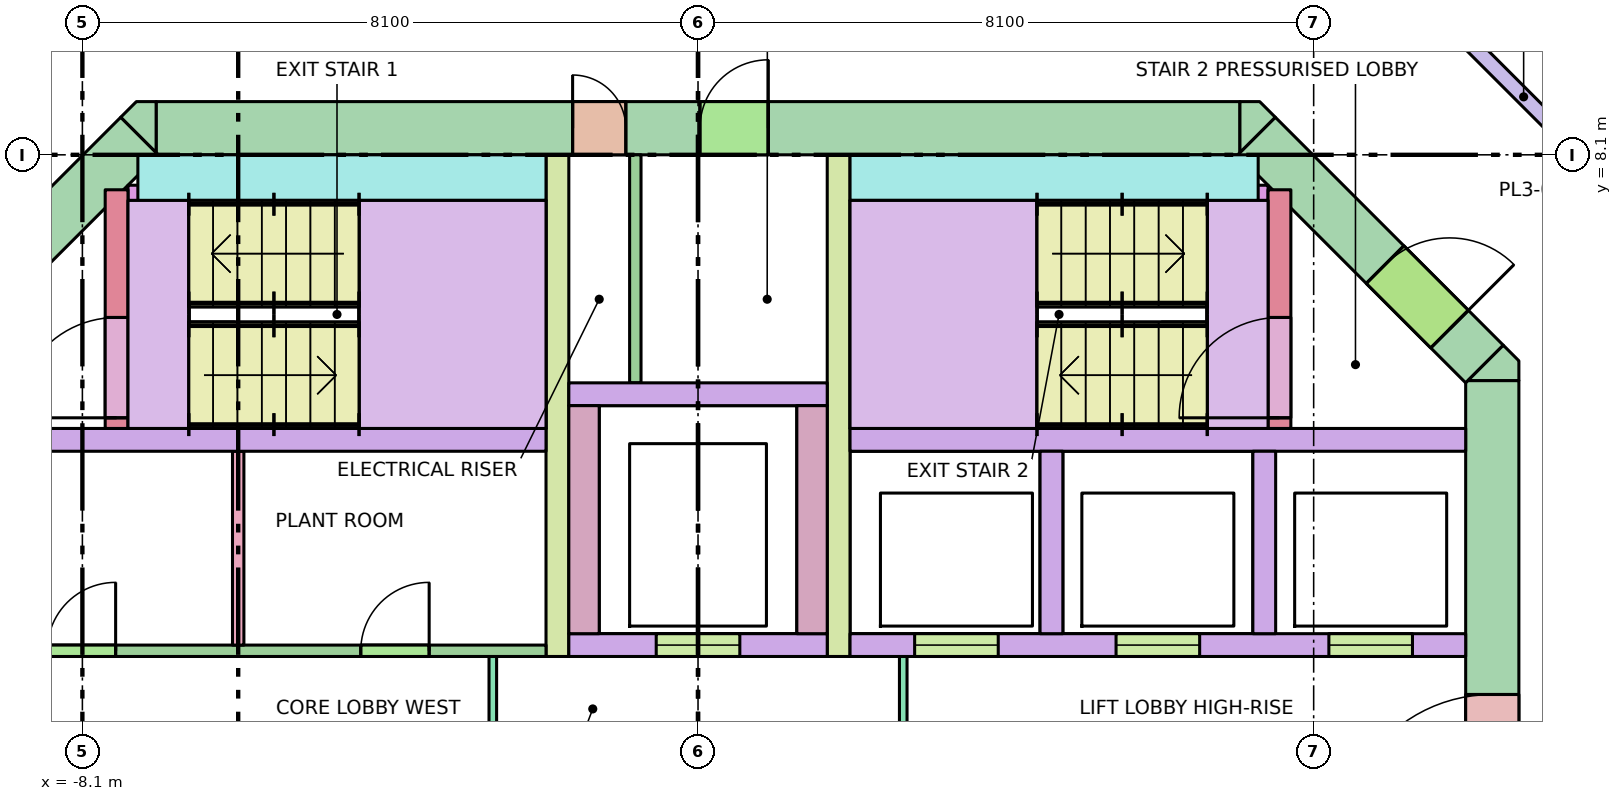
"""IFC4 building model, lengths in metres.
Left out: names, types, materials, properties, quantities, classifications, styles, units other than length and angle.
Written with IfcOpenShell. Run it as: python <this file> out.ifc"""

import sys

from ifc_helpers import new_model, si_unit, direction, frame, frame_2d, origin, place, context, subcontext, project, spatial, polyline, rectangle, outline, extrude, element, fill, save


model = new_model("IFC4")
c1 = context("Model", 3, precision=1e-05, world=origin(), true_north=direction((0.0, 1.0)))
c2 = subcontext(c1, "Body", "Model", "MODEL_VIEW")
j1 = project(units=[si_unit("LENGTHUNIT", "METRE"), si_unit("PLANEANGLEUNIT", "RADIAN")], contexts=[c1])
p1 = place(None, origin())
s1 = spatial("IfcSite", under=j1, at=p1, CompositionType="ELEMENT")
p2 = place(p1, origin())
s2 = spatial("IfcBuilding", under=s1, at=p2, CompositionType="ELEMENT")
p3 = place(p2, frame((0.0, 0.0, 248.3)))
s3 = spatial("IfcBuildingStorey", under=s2, at=p3, CompositionType="ELEMENT", Elevation=248.3)
p4 = place(p3, frame((-7.13, 8.45, -0.28), z_axis=(0.0, 0.0, 1.0), x_axis=(1.0, 0.0, 0.0)))
e1 = element("IfcWall", 1, at=p4, inside=s3, PredefinedType="SHEAR", context=c2, shape_type="SweptSolid", body=[
    extrude(rectangle(XDim=14.26, YDim=0.7, at=frame_2d((7.13, 0.0))), origin(), (0.0, 0.0, 1.0), 5.5),
])
p5 = place(p4, frame((5.48, 0.0, 0.28)))
e2 = element("IfcOpeningElement", 2, at=p5, cuts=e1, PredefinedType="OPENING", context=c2, shape_type="SweptSolid", body=[
    extrude(rectangle(XDim=0.7, YDim=2.1, at=frame_2d((0.35, 1.05))), frame((0.0, 0.36, 0.0), z_axis=(0.0, -1.0, 0.0), x_axis=(1.0, 0.0, 0.0)), (0.0, 0.0, 1.0), 0.72),
])
p6 = place(p4, frame((7.155, 0.0, 0.28)))
e3 = element("IfcOpeningElement", 3, at=p6, cuts=e1, PredefinedType="OPENING", context=c2, shape_type="SweptSolid", body=[
    extrude(rectangle(XDim=0.9, YDim=2.1, at=frame_2d((0.45, 1.05))), frame((0.0, 0.36, 0.0), z_axis=(0.0, -1.0, 0.0), x_axis=(1.0, 0.0, 0.0)), (0.0, 0.0, 1.0), 0.72),
])
p7 = place(p3, frame((10.45, -5.13, -0.28), z_axis=(0.0, 0.0, 1.0), x_axis=(0.0, 1.0, 0.0)))
e4 = element("IfcWall", 4, at=p7, inside=s3, PredefinedType="SHEAR", context=c2, shape_type="SweptSolid", body=[
    extrude(rectangle(XDim=10.26, YDim=0.7, at=frame_2d((5.13, 0.0))), origin(), (0.0, 0.0, 1.0), 5.5),
])
p8 = place(p7, frame((4.13, 0.0, 0.28)))
e5 = element("IfcOpeningElement", 5, at=p8, cuts=e4, PredefinedType="OPENING", context=c2, shape_type="SweptSolid", body=[
    extrude(rectangle(XDim=2.0, YDim=2.1, at=frame_2d((1.0, 1.05))), frame((0.0, 0.36, 0.0), z_axis=(0.0, -1.0, 0.0), x_axis=(1.0, 0.0, 0.0)), (0.0, 0.0, 1.0), 0.72),
])
p9 = place(p3, frame((-10.347, 5.347, -0.28), z_axis=(0.0, 0.0, 1.0), x_axis=(0.707106781187, 0.707106781187, 0.0)))
e6 = element("IfcWall", 6, at=p9, inside=s3, PredefinedType="SHEAR", context=c2, shape_type="SweptSolid", body=[
    extrude(rectangle(XDim=4.243, YDim=0.7, at=frame_2d((2.121, 0.0))), origin(), (0.0, 0.0, 1.0), 5.5),
])
p10 = place(p9, frame((0.65, 0.0, 0.28)))
e7 = element("IfcOpeningElement", 7, at=p10, cuts=e6, PredefinedType="OPENING", context=c2, shape_type="SweptSolid", body=[
    extrude(rectangle(XDim=1.2, YDim=2.1, at=frame_2d((0.6, 1.05))), frame((0.0, 0.36, 0.0), z_axis=(0.0, -1.0, 0.0), x_axis=(1.0, 0.0, 0.0)), (0.0, 0.0, 1.0), 0.72),
])
p11 = place(p3, frame((7.347, 8.347, -0.28), z_axis=(0.0, 0.0, 1.0), x_axis=(0.707106781187, -0.707106781187, 0.0)))
e8 = element("IfcWall", 8, at=p11, inside=s3, PredefinedType="SHEAR", context=c2, shape_type="SweptSolid", body=[
    extrude(rectangle(XDim=4.243, YDim=0.7, at=frame_2d((2.121, 0.0))), origin(), (0.0, 0.0, 1.0), 5.5),
])
p12 = place(p11, frame((2.393, 0.0, 0.28)))
e9 = element("IfcOpeningElement", 9, at=p12, cuts=e8, PredefinedType="OPENING", context=c2, shape_type="SweptSolid", body=[
    extrude(rectangle(XDim=1.2, YDim=2.1, at=frame_2d((0.6, 1.05))), frame((0.0, 0.36, 0.0), z_axis=(0.0, -1.0, 0.0), x_axis=(1.0, 0.0, 0.0)), (0.0, 0.0, 1.0), 0.72),
])
p13 = place(p3, frame((0.0, 0.0, -0.28)))
e10 = element("IfcWall", 10, at=p13, inside=s3, PredefinedType="SHEAR", context=c2, shape_type="SweptSolid", body=[
    extrude(outline(polyline([(10.8, 5.39), (10.8, 5.13), (10.8, 5.13), (10.13, 5.13), (10.595, 5.595), (10.595, 5.595), (10.595, 5.595), (10.8, 5.39)])), origin(), (0.0, 0.0, 1.0), 5.5),
])
p14 = place(p3, frame((0.0, 0.0, -0.28)))
e11 = element("IfcWall", 11, at=p14, inside=s3, PredefinedType="SHEAR", context=c2, shape_type="SweptSolid", body=[
    extrude(outline(polyline([(-7.39, 8.8), (-7.13, 8.8), (-7.13, 8.8), (-7.13, 8.13), (-7.595, 8.595), (-7.595, 8.595), (-7.595, 8.595), (-7.39, 8.8)])), origin(), (0.0, 0.0, 1.0), 5.5),
])
p15 = place(p3, frame((0.0, 0.0, -0.28)))
e12 = element("IfcWall", 12, at=p15, inside=s3, PredefinedType="SHEAR", context=c2, shape_type="SweptSolid", body=[
    extrude(outline(polyline([(7.39, 8.8), (7.595, 8.595), (7.595, 8.595), (7.595, 8.595), (7.13, 8.13), (7.13, 8.8), (7.13, 8.8), (7.39, 8.8)])), origin(), (0.0, 0.0, 1.0), 5.5),
])
for number, where, z_axis, x_axis in (
    (13, (-10.1, 4.35, 0.0), (0.0, 0.0, 1.0), (1.0, 0.0, 0.0)),
    (14, (2.0, 4.35, 0.0), (0.0, 0.0, 1.0), (1.0, 0.0, 0.0)),
):
    element("IfcWall", number, at=place(p3, frame(where, z_axis=z_axis, x_axis=x_axis)), inside=s3, PredefinedType="SOLIDWALL", context=c2, shape_type="SweptSolid", body=[
        extrude(rectangle(XDim=8.1, YDim=0.3, at=frame_2d((4.05, 0.0))), origin(), (0.0, 0.0, 1.0), 5.22),
    ])
p16 = place(p3, frame((2.0, 1.65, 0.0), z_axis=(0.0, 0.0, 1.0), x_axis=(1.0, 0.0, 0.0)))
e15 = element("IfcWall", 15, at=p16, inside=s3, PredefinedType="SOLIDWALL", context=c2, shape_type="SweptSolid", body=[
    extrude(rectangle(XDim=8.1, YDim=0.3, at=frame_2d((4.05, 0.0))), origin(), (0.0, 0.0, 1.0), 5.22),
])
p17 = place(p16, frame((0.85, 0.0, 0.0)))
e16 = element("IfcOpeningElement", 16, at=p17, cuts=e15, PredefinedType="OPENING", context=c2, shape_type="SweptSolid", body=[
    extrude(rectangle(XDim=1.1, YDim=2.1, at=frame_2d((0.55, 1.05))), frame((0.0, 0.16, 0.0), z_axis=(0.0, -1.0, 0.0), x_axis=(1.0, 0.0, 0.0)), (0.0, 0.0, 1.0), 0.32),
])
p18 = place(p16, frame((3.5, 0.0, 0.0)))
e17 = element("IfcOpeningElement", 17, at=p18, cuts=e15, PredefinedType="OPENING", context=c2, shape_type="SweptSolid", body=[
    extrude(rectangle(XDim=1.1, YDim=2.1, at=frame_2d((0.55, 1.05))), frame((0.0, 0.16, 0.0), z_axis=(0.0, -1.0, 0.0), x_axis=(1.0, 0.0, 0.0)), (0.0, 0.0, 1.0), 0.32),
])
p19 = place(p16, frame((6.3, 0.0, 0.0)))
e18 = element("IfcOpeningElement", 18, at=p19, cuts=e15, PredefinedType="OPENING", context=c2, shape_type="SweptSolid", body=[
    extrude(rectangle(XDim=1.1, YDim=2.1, at=frame_2d((0.55, 1.05))), frame((0.0, 0.16, 0.0), z_axis=(0.0, -1.0, 0.0), x_axis=(1.0, 0.0, 0.0)), (0.0, 0.0, 1.0), 0.32),
])
for number, where, z_axis, x_axis in (
    (19, (4.65, 1.8, 0.0), (0.0, 0.0, 1.0), (0.0, 1.0, 0.0)),
    (20, (7.45, 1.8, 0.0), (0.0, 0.0, 1.0), (0.0, 1.0, 0.0)),
):
    element("IfcWall", number, at=place(p3, frame(where, z_axis=z_axis, x_axis=x_axis)), inside=s3, PredefinedType="SOLIDWALL", context=c2, shape_type="SweptSolid", body=[
        extrude(rectangle(XDim=2.4, YDim=0.3, at=frame_2d((1.2, 0.0))), origin(), (0.0, 0.0, 1.0), 5.22),
    ])
for number, where, z_axis, x_axis in (
    (21, (-1.85, 1.5, 0.0), (0.0, 0.0, 1.0), (0.0, 1.0, 0.0)),
    (22, (1.85, 1.5, 0.0), (0.0, 0.0, 1.0), (0.0, 1.0, 0.0)),
):
    element("IfcWall", number, at=place(p3, frame(where, z_axis=z_axis, x_axis=x_axis)), inside=s3, PredefinedType="SHEAR", context=c2, shape_type="SweptSolid", body=[
        extrude(rectangle(XDim=6.6, YDim=0.3, at=frame_2d((3.3, 0.0))), origin(), (0.0, 0.0, 1.0), 5.22),
    ])
p20 = place(p3, frame((-1.7, 1.65, 0.0), z_axis=(0.0, 0.0, 1.0), x_axis=(1.0, 0.0, 0.0)))
e23 = element("IfcWall", 23, at=p20, inside=s3, PredefinedType="SOLIDWALL", context=c2, shape_type="SweptSolid", body=[
    extrude(rectangle(XDim=3.4, YDim=0.3, at=frame_2d((1.7, 0.0))), origin(), (0.0, 0.0, 1.0), 5.22),
])
p21 = place(p20, frame((1.15, 0.0, 0.0)))
e24 = element("IfcOpeningElement", 24, at=p21, cuts=e23, PredefinedType="OPENING", context=c2, shape_type="SweptSolid", body=[
    extrude(rectangle(XDim=1.1, YDim=2.1, at=frame_2d((0.55, 1.05))), frame((0.0, 0.16, 0.0), z_axis=(0.0, -1.0, 0.0), x_axis=(1.0, 0.0, 0.0)), (0.0, 0.0, 1.0), 0.32),
])
for number, where, z_axis, x_axis in (
    (25, (-1.5, 1.8, 0.0), (0.0, 0.0, 1.0), (0.0, 1.0, 0.0)),
    (26, (1.5, 1.8, 0.0), (0.0, 0.0, 1.0), (0.0, 1.0, 0.0)),
):
    element("IfcWall", number, at=place(p3, frame(where, z_axis=z_axis, x_axis=x_axis)), inside=s3, PredefinedType="SOLIDWALL", context=c2, shape_type="SweptSolid", body=[
        extrude(rectangle(XDim=3.0, YDim=0.4, at=frame_2d((1.5, 0.0))), origin(), (0.0, 0.0, 1.0), 5.22),
    ])
p22 = place(p3, frame((-1.7, 4.95, 0.0), z_axis=(0.0, 0.0, 1.0), x_axis=(1.0, 0.0, 0.0)))
e27 = element("IfcWall", 27, at=p22, inside=s3, PredefinedType="SOLIDWALL", context=c2, shape_type="SweptSolid", body=[
    extrude(rectangle(XDim=3.4, YDim=0.3, at=frame_2d((1.7, 0.0))), origin(), (0.0, 0.0, 1.0), 5.22),
])
p23 = place(p3, frame((-7.65, 4.5, 0.0), z_axis=(0.0, 0.0, 1.0), x_axis=(0.0, 1.0, 0.0)))
e28 = element("IfcWall", 28, at=p23, inside=s3, PredefinedType="SHEAR", context=c2, shape_type="SweptSolid", body=[
    extrude(rectangle(XDim=3.14, YDim=0.3, at=frame_2d((1.57, 0.0))), origin(), (0.0, 0.0, 1.0), 5.22),
])
p24 = place(p23, frame((0.14, 0.0, 0.0)))
e29 = element("IfcOpeningElement", 29, at=p24, cuts=e28, PredefinedType="OPENING", context=c2, shape_type="SweptSolid", body=[
    extrude(rectangle(XDim=1.32, YDim=2.1, at=frame_2d((0.66, 1.05))), frame((0.0, 0.16, 0.0), z_axis=(0.0, -1.0, 0.0), x_axis=(1.0, 0.0, 0.0)), (0.0, 0.0, 1.0), 0.32),
])
p25 = place(p3, frame((-7.37, 7.8, 0.0), z_axis=(0.0, 0.0, 1.0), x_axis=(1.0, 0.0, 0.0)))
e30 = element("IfcWall", 30, at=p25, inside=s3, PredefinedType="SHEAR", context=c2, shape_type="SweptSolid", body=[
    extrude(rectangle(XDim=5.37, YDim=0.6, at=frame_2d((2.685, 0.0))), origin(), (0.0, 0.0, 1.0), 5.22),
])
p26 = place(p3, frame((7.65, 4.5, 0.0), z_axis=(0.0, 0.0, 1.0), x_axis=(0.0, 1.0, 0.0)))
e31 = element("IfcWall", 31, at=p26, inside=s3, PredefinedType="SHEAR", context=c2, shape_type="SweptSolid", body=[
    extrude(rectangle(XDim=3.14, YDim=0.3, at=frame_2d((1.57, 0.0))), origin(), (0.0, 0.0, 1.0), 5.22),
])
p27 = place(p26, frame((0.14, 0.0, 0.0)))
e32 = element("IfcOpeningElement", 32, at=p27, cuts=e31, PredefinedType="OPENING", context=c2, shape_type="SweptSolid", body=[
    extrude(rectangle(XDim=1.32, YDim=2.1, at=frame_2d((0.66, 1.05))), frame((0.0, 0.16, 0.0), z_axis=(0.0, -1.0, 0.0), x_axis=(1.0, 0.0, 0.0)), (0.0, 0.0, 1.0), 0.32),
])
p28 = place(p3, frame((2.0, 7.8, 0.0), z_axis=(0.0, 0.0, 1.0), x_axis=(1.0, 0.0, 0.0)))
e33 = element("IfcWall", 33, at=p28, inside=s3, PredefinedType="SHEAR", context=c2, shape_type="SweptSolid", body=[
    extrude(rectangle(XDim=5.37, YDim=0.6, at=frame_2d((2.685, 0.0))), origin(), (0.0, 0.0, 1.0), 5.22),
])
for number, where, z_axis, x_axis in (
    (34, (-7.5, 7.6, 0.0), (0.0, 0.0, 1.0), (1.0, 0.0, 0.0)),
    (35, (6.9, 7.6, 0.0), (0.0, 0.0, 1.0), (1.0, 0.0, 0.0)),
):
    element("IfcWall", number, at=place(p3, frame(where, z_axis=z_axis, x_axis=x_axis)), inside=s3, PredefinedType="SHEAR", context=c2, shape_type="SweptSolid", body=[
        extrude(rectangle(XDim=0.6, YDim=0.2, at=frame_2d((0.3, 0.0))), origin(), (0.0, 0.0, 1.0), 5.22),
    ])
p29 = place(p3, frame((-2.7, -1.5, 0.0), z_axis=(0.0, 0.0, 1.0), x_axis=(0.0, 1.0, 0.0)))
e36 = element("IfcWall", 36, at=p29, inside=s3, PredefinedType="PARTITIONING", context=c2, shape_type="SweptSolid", body=[
    extrude(rectangle(XDim=3.0, YDim=0.1, at=frame_2d((1.5, 0.0))), origin(), (0.0, 0.0, 1.0), 5.22),
])
p30 = place(p29, frame((0.9, 0.0, 0.0)))
e37 = element("IfcOpeningElement", 37, at=p30, cuts=e36, PredefinedType="OPENING", context=c2, shape_type="SweptSolid", body=[
    extrude(rectangle(XDim=1.2, YDim=2.1, at=frame_2d((0.6, 1.05))), frame((0.0, 0.06, 0.0), z_axis=(0.0, -1.0, 0.0), x_axis=(1.0, 0.0, 0.0)), (0.0, 0.0, 1.0), 0.12),
])
p31 = place(p3, frame((2.7, -1.5, 0.0), z_axis=(0.0, 0.0, 1.0), x_axis=(0.0, 1.0, 0.0)))
e38 = element("IfcWall", 38, at=p31, inside=s3, PredefinedType="PARTITIONING", context=c2, shape_type="SweptSolid", body=[
    extrude(rectangle(XDim=3.0, YDim=0.1, at=frame_2d((1.5, 0.0))), origin(), (0.0, 0.0, 1.0), 5.22),
])
p32 = place(p31, frame((0.9, 0.0, 0.0)))
e39 = element("IfcOpeningElement", 39, at=p32, cuts=e38, PredefinedType="OPENING", context=c2, shape_type="SweptSolid", body=[
    extrude(rectangle(XDim=1.2, YDim=2.1, at=frame_2d((0.6, 1.05))), frame((0.0, 0.06, 0.0), z_axis=(0.0, -1.0, 0.0), x_axis=(1.0, 0.0, 0.0)), (0.0, 0.0, 1.0), 0.12),
])
p33 = place(p3, frame((-0.825, 5.1, 0.0), z_axis=(0.0, 0.0, 1.0), x_axis=(0.0, 1.0, 0.0)))
e40 = element("IfcWall", 40, at=p33, inside=s3, PredefinedType="PARTITIONING", context=c2, shape_type="SweptSolid", body=[
    extrude(rectangle(XDim=3.0, YDim=0.15, at=frame_2d((1.5, 0.0))), origin(), (0.0, 0.0, 1.0), 5.22),
])
p34 = place(p3, frame((-6.05, 1.65, 0.0), z_axis=(0.0, 0.0, 1.0), x_axis=(0.0, 1.0, 0.0)))
e41 = element("IfcWall", 41, at=p34, inside=s3, PredefinedType="PARTITIONING", context=c2, shape_type="SweptSolid", body=[
    extrude(rectangle(XDim=2.55, YDim=0.15, at=frame_2d((1.275, 0.0))), origin(), (0.0, 0.0, 1.0), 5.22),
])
p35 = place(p3, frame((-10.1, 1.575, 0.0), z_axis=(0.0, 0.0, 1.0), x_axis=(1.0, 0.0, 0.0)))
e42 = element("IfcWall", 42, at=p35, inside=s3, PredefinedType="PARTITIONING", context=c2, shape_type="SweptSolid", body=[
    extrude(rectangle(XDim=8.1, YDim=0.15, at=frame_2d((4.05, 0.0))), origin(), (0.0, 0.0, 1.0), 5.22),
])
p36 = place(p35, frame((1.538, 0.0, 0.0)))
e43 = element("IfcOpeningElement", 43, at=p36, cuts=e42, PredefinedType="OPENING", context=c2, shape_type="SweptSolid", body=[
    extrude(rectangle(XDim=0.9, YDim=2.1, at=frame_2d((0.45, 1.05))), frame((0.0, 0.085, 0.0), z_axis=(0.0, -1.0, 0.0), x_axis=(1.0, 0.0, 0.0)), (0.0, 0.0, 1.0), 0.17),
])
p37 = place(p35, frame((5.663, 0.0, 0.0)))
e44 = element("IfcOpeningElement", 44, at=p37, cuts=e42, PredefinedType="OPENING", context=c2, shape_type="SweptSolid", body=[
    extrude(rectangle(XDim=0.9, YDim=2.1, at=frame_2d((0.45, 1.05))), frame((0.0, 0.085, 0.0), z_axis=(0.0, -1.0, 0.0), x_axis=(1.0, 0.0, 0.0)), (0.0, 0.0, 1.0), 0.17),
])
p38 = place(p3, frame((-13.25, 6.475, 0.0), z_axis=(0.0, 0.0, 1.0), x_axis=(0.707106781187, 0.707106781187, 0.0)))
e45 = element("IfcWall", 45, at=p38, inside=s3, PredefinedType="PARTITIONING", context=c2, shape_type="SweptSolid", body=[
    extrude(rectangle(XDim=6.753, YDim=0.2, at=frame_2d((3.377, 0.0))), origin(), (0.0, 0.0, 1.0), 4.37),
])
p39 = place(p38, frame((5.297, 0.0, 0.0)))
e46 = element("IfcOpeningElement", 46, at=p39, cuts=e45, PredefinedType="OPENING", context=c2, shape_type="SweptSolid", body=[
    extrude(rectangle(XDim=0.9, YDim=2.1, at=frame_2d((0.45, 1.05))), frame((0.0, 0.11, 0.0), z_axis=(0.0, -1.0, 0.0), x_axis=(1.0, 0.0, 0.0)), (0.0, 0.0, 1.0), 0.22),
])
p40 = place(p3, frame((8.475, 11.25, 0.0), z_axis=(0.0, 0.0, 1.0), x_axis=(0.707106781187, -0.707106781187, 0.0)))
e47 = element("IfcWall", 47, at=p40, inside=s3, PredefinedType="PARTITIONING", context=c2, shape_type="SweptSolid", body=[
    extrude(rectangle(XDim=6.753, YDim=0.2, at=frame_2d((3.377, 0.0))), origin(), (0.0, 0.0, 1.0), 4.37),
])
p41 = place(p40, frame((3.883, 0.0, 0.0)))
e48 = element("IfcOpeningElement", 48, at=p41, cuts=e47, PredefinedType="OPENING", context=c2, shape_type="SweptSolid", body=[
    extrude(rectangle(XDim=0.9, YDim=2.1, at=frame_2d((0.45, 1.05))), frame((0.0, 0.11, 0.0), z_axis=(0.0, -1.0, 0.0), x_axis=(1.0, 0.0, 0.0)), (0.0, 0.0, 1.0), 0.22),
])
p42 = place(p40, frame((0.556, 0.0, 0.0)))
e49 = element("IfcOpeningElement", 49, at=p42, cuts=e47, PredefinedType="OPENING", context=c2, shape_type="SweptSolid", body=[
    extrude(rectangle(XDim=0.9, YDim=2.1, at=frame_2d((0.45, 1.05))), frame((0.0, 0.11, 0.0), z_axis=(0.0, -1.0, 0.0), x_axis=(1.0, 0.0, 0.0)), (0.0, 0.0, 1.0), 0.22),
])
p43 = place(p17, origin())
e50 = element("IfcDoor", 50, at=p43, inside=s3, OperationType="DOUBLE_DOOR_SLIDING", PredefinedType="DOOR", context=c2, shape_type="SweptSolid", body=[
    extrude(rectangle(XDim=1.1, YDim=2.1, at=frame_2d((0.55, 1.05))), frame((0.0, 0.025, 0.0), z_axis=(0.0, -1.0, 0.0), x_axis=(1.0, 0.0, 0.0)), (0.0, 0.0, 1.0), 0.05),
])
fill(e16, e50)
p44 = place(p18, origin())
e51 = element("IfcDoor", 51, at=p44, inside=s3, OperationType="DOUBLE_DOOR_SLIDING", PredefinedType="DOOR", context=c2, shape_type="SweptSolid", body=[
    extrude(rectangle(XDim=1.1, YDim=2.1, at=frame_2d((0.55, 1.05))), frame((0.0, 0.025, 0.0), z_axis=(0.0, -1.0, 0.0), x_axis=(1.0, 0.0, 0.0)), (0.0, 0.0, 1.0), 0.05),
])
fill(e17, e51)
p45 = place(p19, origin())
e52 = element("IfcDoor", 52, at=p45, inside=s3, OperationType="DOUBLE_DOOR_SLIDING", PredefinedType="DOOR", context=c2, shape_type="SweptSolid", body=[
    extrude(rectangle(XDim=1.1, YDim=2.1, at=frame_2d((0.55, 1.05))), frame((0.0, 0.025, 0.0), z_axis=(0.0, -1.0, 0.0), x_axis=(1.0, 0.0, 0.0)), (0.0, 0.0, 1.0), 0.05),
])
fill(e18, e52)
p46 = place(p21, origin())
e53 = element("IfcDoor", 53, at=p46, inside=s3, OperationType="DOUBLE_DOOR_SLIDING", PredefinedType="DOOR", context=c2, shape_type="SweptSolid", body=[
    extrude(rectangle(XDim=1.1, YDim=2.1, at=frame_2d((0.55, 1.05))), frame((0.0, 0.025, 0.0), z_axis=(0.0, -1.0, 0.0), x_axis=(1.0, 0.0, 0.0)), (0.0, 0.0, 1.0), 0.05),
])
fill(e24, e53)
p47 = place(p24, origin())
e54 = element("IfcDoor", 54, at=p47, inside=s3, OperationType="DOUBLE_DOOR_SINGLE_SWING", PredefinedType="DOOR", context=c2, shape_type="SweptSolid", body=[
    extrude(rectangle(XDim=1.32, YDim=2.1, at=frame_2d((0.66, 1.05))), frame((0.0, 0.025, 0.0), z_axis=(0.0, -1.0, 0.0), x_axis=(1.0, 0.0, 0.0)), (0.0, 0.0, 1.0), 0.05),
])
fill(e29, e54)
p48 = place(p27, origin())
e55 = element("IfcDoor", 55, at=p48, inside=s3, OperationType="DOUBLE_DOOR_SINGLE_SWING", PredefinedType="DOOR", context=c2, shape_type="SweptSolid", body=[
    extrude(rectangle(XDim=1.32, YDim=2.1, at=frame_2d((0.66, 1.05))), frame((0.0, 0.025, 0.0), z_axis=(0.0, -1.0, 0.0), x_axis=(1.0, 0.0, 0.0)), (0.0, 0.0, 1.0), 0.05),
])
fill(e32, e55)
p49 = place(p12, origin())
e56 = element("IfcDoor", 56, at=p49, inside=s3, OperationType="SINGLE_SWING_RIGHT", PredefinedType="DOOR", context=c2, shape_type="SweptSolid", body=[
    extrude(rectangle(XDim=1.2, YDim=2.1, at=frame_2d((0.6, 1.05))), frame((0.0, 0.025, 0.0), z_axis=(0.0, -1.0, 0.0), x_axis=(1.0, 0.0, 0.0)), (0.0, 0.0, 1.0), 0.05),
])
fill(e9, e56)
p50 = place(p8, origin())
e57 = element("IfcDoor", 57, at=p50, inside=s3, OperationType="DOUBLE_DOOR_SINGLE_SWING", PredefinedType="DOOR", context=c2, shape_type="SweptSolid", body=[
    extrude(rectangle(XDim=2.0, YDim=2.1, at=frame_2d((1.0, 1.05))), frame((0.0, 0.025, 0.0), z_axis=(0.0, -1.0, 0.0), x_axis=(1.0, 0.0, 0.0)), (0.0, 0.0, 1.0), 0.05),
])
fill(e5, e57)
p51 = place(p5, origin())
e58 = element("IfcDoor", 58, at=p51, inside=s3, OperationType="SINGLE_SWING_LEFT", PredefinedType="DOOR", context=c2, shape_type="SweptSolid", body=[
    extrude(rectangle(XDim=0.7, YDim=2.1, at=frame_2d((0.35, 1.05))), frame((0.0, 0.025, 0.0), z_axis=(0.0, -1.0, 0.0), x_axis=(1.0, 0.0, 0.0)), (0.0, 0.0, 1.0), 0.05),
])
fill(e2, e58)
p52 = place(p6, origin())
e59 = element("IfcDoor", 59, at=p52, inside=s3, OperationType="SINGLE_SWING_RIGHT", PredefinedType="DOOR", context=c2, shape_type="SweptSolid", body=[
    extrude(rectangle(XDim=0.9, YDim=2.1, at=frame_2d((0.45, 1.05))), frame((0.0, 0.025, 0.0), z_axis=(0.0, -1.0, 0.0), x_axis=(1.0, 0.0, 0.0)), (0.0, 0.0, 1.0), 0.05),
])
fill(e3, e59)
p53 = place(p36, origin())
e60 = element("IfcDoor", 60, at=p53, inside=s3, OperationType="SINGLE_SWING_RIGHT", PredefinedType="DOOR", context=c2, shape_type="SweptSolid", body=[
    extrude(rectangle(XDim=0.9, YDim=2.1, at=frame_2d((0.45, 1.05))), frame((0.0, 0.025, 0.0), z_axis=(0.0, -1.0, 0.0), x_axis=(1.0, 0.0, 0.0)), (0.0, 0.0, 1.0), 0.05),
])
fill(e43, e60)
p54 = place(p37, origin())
e61 = element("IfcDoor", 61, at=p54, inside=s3, OperationType="SINGLE_SWING_RIGHT", PredefinedType="DOOR", context=c2, shape_type="SweptSolid", body=[
    extrude(rectangle(XDim=0.9, YDim=2.1, at=frame_2d((0.45, 1.05))), frame((0.0, 0.025, 0.0), z_axis=(0.0, -1.0, 0.0), x_axis=(1.0, 0.0, 0.0)), (0.0, 0.0, 1.0), 0.05),
])
fill(e44, e61)
save(model, sys.argv[1])
